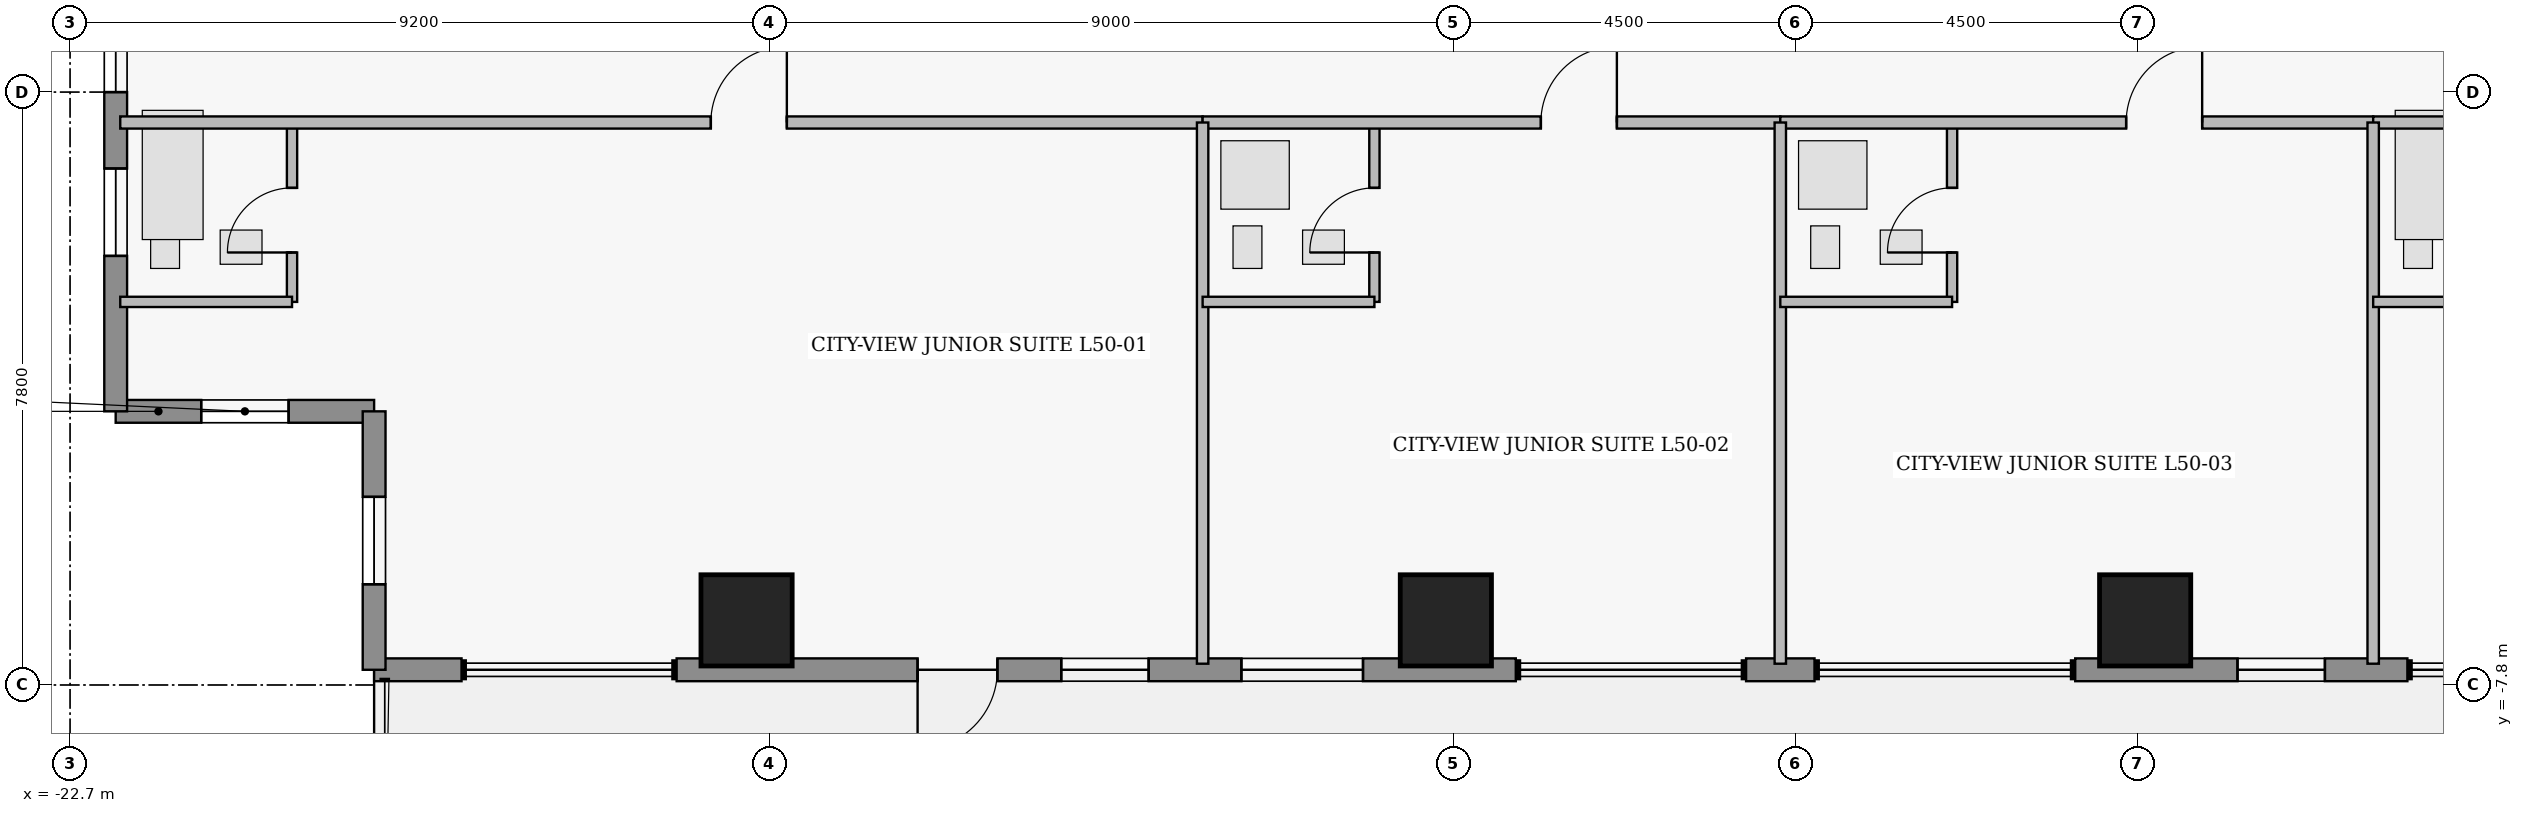
"""IFC4 building model, lengths in metres.
Left out: names, types, materials, properties, quantities, classifications, styles, units other than length and angle.
Written with IfcOpenShell. Run it as: python <this file> out.ifc"""

import sys

from ifc_helpers import new_model, si_unit, direction, frame, frame_2d, origin, origin_2d, place, context, subcontext, project, spatial, rectangle, extrude, element, fill, save


model = new_model("IFC4")
c1 = context("Model", 3, precision=1e-05, world=origin(), true_north=direction((0.0, 1.0)))
c2 = subcontext(c1, "Body", "Model", "MODEL_VIEW")
j1 = project(units=[si_unit("LENGTHUNIT", "METRE"), si_unit("PLANEANGLEUNIT", "RADIAN")], contexts=[c1])
p1 = place(None, origin())
s1 = spatial("IfcSite", under=j1, at=p1, CompositionType="ELEMENT")
p2 = place(p1, origin())
s2 = spatial("IfcBuilding", under=s1, at=p2, CompositionType="ELEMENT")
p3 = place(p2, frame((0.0, 0.0, 199.9)))
s3 = spatial("IfcBuildingStorey", under=s2, at=p3, CompositionType="ELEMENT", Elevation=199.9)
for number, where, z_axis, x_axis in (
    (1, (-13.8, -6.95, 0.0), (0.0, 0.0, 1.0), (1.0, 0.0, 0.0)),
    (2, (-4.6, -6.95, 0.0), (0.0, 0.0, 1.0), (1.0, 0.0, 0.0)),
    (3, (4.6, -6.95, 0.0), (0.0, 0.0, 1.0), (1.0, 0.0, 0.0)),
):
    element("IfcColumn", number, at=place(p3, frame(where, z_axis=z_axis, x_axis=x_axis)), inside=s3, PredefinedType="COLUMN", context=c2, shape_type="SweptSolid", body=[
        extrude(rectangle(XDim=1.2, YDim=1.2, at=origin_2d()), origin(), (0.0, 0.0, 1.0), 3.75),
    ])
p4 = place(p3, frame((-18.7, -4.2, 0.0), z_axis=(0.0, 0.0, 1.0), x_axis=(-1.0, 0.0, 0.0)))
e4 = element("IfcWall", 4, at=p4, inside=s3, PredefinedType="STANDARD", context=c2, shape_type="SweptSolid", body=[
    extrude(rectangle(XDim=3.4, YDim=0.3, at=frame_2d((1.7, 0.0))), origin(), (0.0, 0.0, 1.0), 3.53),
])
p5 = place(p4, frame((1.125, 0.0, 1.25)))
e5 = element("IfcOpeningElement", 5, at=p5, cuts=e4, PredefinedType="OPENING", context=c2, shape_type="SweptSolid", body=[
    extrude(rectangle(XDim=1.15, YDim=1.55, at=frame_2d((0.575, 0.775))), frame((0.0, 0.16, 0.0), z_axis=(0.0, -1.0, 0.0), x_axis=(1.0, 0.0, 0.0)), (0.0, 0.0, 1.0), 0.32),
])
p6 = place(p3, frame((-22.1, -4.2, 0.0), z_axis=(0.0, 0.0, 1.0), x_axis=(0.0, 1.0, 0.0)))
e6 = element("IfcWall", 6, at=p6, inside=s3, PredefinedType="STANDARD", context=c2, shape_type="SweptSolid", body=[
    extrude(rectangle(XDim=6.2, YDim=0.3, at=frame_2d((3.1, 0.0))), origin(), (0.0, 0.0, 1.0), 3.53),
])
p7 = place(p6, frame((2.045, 0.0, 0.95)))
e7 = element("IfcOpeningElement", 7, at=p7, cuts=e6, PredefinedType="OPENING", context=c2, shape_type="SweptSolid", body=[
    extrude(rectangle(XDim=1.15, YDim=1.55, at=frame_2d((0.575, 0.775))), frame((0.0, 0.16, 0.0), z_axis=(0.0, -1.0, 0.0), x_axis=(1.0, 0.0, 0.0)), (0.0, 0.0, 1.0), 0.32),
])
p8 = place(p6, frame((4.2, 0.0, 0.95)))
e8 = element("IfcOpeningElement", 8, at=p8, cuts=e6, PredefinedType="OPENING", context=c2, shape_type="SweptSolid", body=[
    extrude(rectangle(XDim=1.15, YDim=1.55, at=frame_2d((0.575, 0.775))), frame((0.0, 0.16, 0.0), z_axis=(0.0, -1.0, 0.0), x_axis=(1.0, 0.0, 0.0)), (0.0, 0.0, 1.0), 0.32),
])
p9 = place(p3, frame((8.05, -7.6, 0.0), z_axis=(0.0, 0.0, 1.0), x_axis=(-1.0, 0.0, 0.0)))
e9 = element("IfcWall", 9, at=p9, inside=s3, PredefinedType="STANDARD", context=c2, shape_type="SweptSolid", body=[
    extrude(rectangle(XDim=4.37, YDim=0.3, at=frame_2d((2.185, 0.0))), origin(), (0.0, 0.0, 1.0), 3.53),
])
p10 = place(p9, frame((1.085, 0.0, 0.95)))
e10 = element("IfcOpeningElement", 10, at=p10, cuts=e9, PredefinedType="OPENING", context=c2, shape_type="SweptSolid", body=[
    extrude(rectangle(XDim=1.15, YDim=1.55, at=frame_2d((0.575, 0.775))), frame((0.0, 0.16, 0.0), z_axis=(0.0, -1.0, 0.0), x_axis=(1.0, 0.0, 0.0)), (0.0, 0.0, 1.0), 0.32),
])
p11 = place(p3, frame((0.25, -7.6, 0.0), z_axis=(0.0, 0.0, 1.0), x_axis=(-1.0, 0.0, 0.0)))
e11 = element("IfcWall", 11, at=p11, inside=s3, PredefinedType="STANDARD", context=c2, shape_type="SweptSolid", body=[
    extrude(rectangle(XDim=0.9, YDim=0.3, at=frame_2d((0.45, 0.0))), origin(), (0.0, 0.0, 1.0), 3.53),
])
p12 = place(p3, frame((-3.68, -7.6, 0.0), z_axis=(0.0, 0.0, 1.0), x_axis=(-1.0, 0.0, 0.0)))
e12 = element("IfcWall", 12, at=p12, inside=s3, PredefinedType="STANDARD", context=c2, shape_type="SweptSolid", body=[
    extrude(rectangle(XDim=11.04, YDim=0.3, at=frame_2d((5.52, 0.0))), origin(), (0.0, 0.0, 1.0), 3.53),
])
p13 = place(p12, frame((6.82, 0.0, 0.0)))
e13 = element("IfcOpeningElement", 13, at=p13, cuts=e12, PredefinedType="OPENING", context=c2, shape_type="SweptSolid", body=[
    extrude(rectangle(XDim=1.05, YDim=2.2, at=frame_2d((0.525, 1.1))), frame((0.0, 0.16, 0.0), z_axis=(0.0, -1.0, 0.0), x_axis=(1.0, 0.0, 0.0)), (0.0, 0.0, 1.0), 0.32),
])
p14 = place(p12, frame((2.01, 0.0, 0.85)))
e14 = element("IfcOpeningElement", 14, at=p14, cuts=e12, PredefinedType="OPENING", context=c2, shape_type="SweptSolid", body=[
    extrude(rectangle(XDim=1.6, YDim=1.8, at=frame_2d((0.8, 0.9))), frame((0.0, 0.16, 0.0), z_axis=(0.0, -1.0, 0.0), x_axis=(1.0, 0.0, 0.0)), (0.0, 0.0, 1.0), 0.32),
])
p15 = place(p12, frame((4.83, 0.0, 0.95)))
e15 = element("IfcOpeningElement", 15, at=p15, cuts=e12, PredefinedType="OPENING", context=c2, shape_type="SweptSolid", body=[
    extrude(rectangle(XDim=1.15, YDim=1.55, at=frame_2d((0.575, 0.775))), frame((0.0, 0.16, 0.0), z_axis=(0.0, -1.0, 0.0), x_axis=(1.0, 0.0, 0.0)), (0.0, 0.0, 1.0), 0.32),
])
p16 = place(p3, frame((-17.55, -7.6, 0.0), z_axis=(0.0, 0.0, 1.0), x_axis=(-1.0, 0.0, 0.0)))
e16 = element("IfcWall", 16, at=p16, inside=s3, PredefinedType="STANDARD", context=c2, shape_type="SweptSolid", body=[
    extrude(rectangle(XDim=1.15, YDim=0.3, at=frame_2d((0.575, 0.0))), origin(), (0.0, 0.0, 1.0), 3.53),
])
p17 = place(p3, frame((-18.7, -7.6, 0.0), z_axis=(0.0, 0.0, 1.0), x_axis=(0.0, 1.0, 0.0)))
e17 = element("IfcWall", 17, at=p17, inside=s3, PredefinedType="STANDARD", context=c2, shape_type="SweptSolid", body=[
    extrude(rectangle(XDim=3.4, YDim=0.3, at=frame_2d((1.7, 0.0))), origin(), (0.0, 0.0, 1.0), 3.53),
])
p18 = place(p17, frame((1.125, 0.0, 1.25)))
e18 = element("IfcOpeningElement", 18, at=p18, cuts=e17, PredefinedType="OPENING", context=c2, shape_type="SweptSolid", body=[
    extrude(rectangle(XDim=1.15, YDim=1.55, at=frame_2d((0.575, 0.775))), frame((0.0, 0.16, 0.0), z_axis=(0.0, -1.0, 0.0), x_axis=(1.0, 0.0, 0.0)), (0.0, 0.0, 1.0), 0.32),
])
p19 = place(p3, frame((-19.78, -2.76, 0.0), z_axis=(0.0, 0.0, 1.0), x_axis=(0.0, 1.0, 0.0)))
e19 = element("IfcWall", 19, at=p19, inside=s3, PredefinedType="PLUMBINGWALL", context=c2, shape_type="SweptSolid", body=[
    extrude(rectangle(XDim=2.36, YDim=0.135, at=frame_2d((1.18, 0.0))), origin(), (0.0, 0.0, 1.0), 3.53),
])
p20 = place(p19, frame((0.65, 0.0, 0.0)))
e20 = element("IfcOpeningElement", 20, at=p20, cuts=e19, PredefinedType="OPENING", context=c2, shape_type="SweptSolid", body=[
    extrude(rectangle(XDim=0.85, YDim=2.1, at=frame_2d((0.425, 1.05))), frame((0.0, 0.077, 0.0), z_axis=(0.0, -1.0, 0.0), x_axis=(1.0, 0.0, 0.0)), (0.0, 0.0, 1.0), 0.155),
])
p21 = place(p3, frame((-22.04, -0.4, 0.0), z_axis=(0.0, 0.0, 1.0), x_axis=(1.0, 0.0, 0.0)))
e21 = element("IfcWall", 21, at=p21, inside=s3, PredefinedType="PARTITIONING", context=c2, shape_type="SweptSolid", body=[
    extrude(rectangle(XDim=14.24, YDim=0.16, at=frame_2d((7.12, 0.0))), origin(), (0.0, 0.0, 1.0), 3.53),
])
p22 = place(p21, frame((7.77, 0.0, 0.0)))
e22 = element("IfcOpeningElement", 22, at=p22, cuts=e21, PredefinedType="OPENING", context=c2, shape_type="SweptSolid", body=[
    extrude(rectangle(XDim=1.0, YDim=2.15, at=frame_2d((0.5, 1.075))), frame((0.0, 0.09, 0.0), z_axis=(0.0, -1.0, 0.0), x_axis=(1.0, 0.0, 0.0)), (0.0, 0.0, 1.0), 0.18),
])
p23 = place(p3, frame((-5.54, -2.76, 0.0), z_axis=(0.0, 0.0, 1.0), x_axis=(0.0, 1.0, 0.0)))
e23 = element("IfcWall", 23, at=p23, inside=s3, PredefinedType="PLUMBINGWALL", context=c2, shape_type="SweptSolid", body=[
    extrude(rectangle(XDim=2.36, YDim=0.135, at=frame_2d((1.18, 0.0))), origin(), (0.0, 0.0, 1.0), 3.53),
])
p24 = place(p23, frame((0.65, 0.0, 0.0)))
e24 = element("IfcOpeningElement", 24, at=p24, cuts=e23, PredefinedType="OPENING", context=c2, shape_type="SweptSolid", body=[
    extrude(rectangle(XDim=0.85, YDim=2.1, at=frame_2d((0.425, 1.05))), frame((0.0, 0.077, 0.0), z_axis=(0.0, -1.0, 0.0), x_axis=(1.0, 0.0, 0.0)), (0.0, 0.0, 1.0), 0.155),
])
p25 = place(p3, frame((-7.8, -0.4, 0.0), z_axis=(0.0, 0.0, 1.0), x_axis=(1.0, 0.0, 0.0)))
e25 = element("IfcWall", 25, at=p25, inside=s3, PredefinedType="PARTITIONING", context=c2, shape_type="SweptSolid", body=[
    extrude(rectangle(XDim=7.6, YDim=0.16, at=frame_2d((3.8, 0.0))), origin(), (0.0, 0.0, 1.0), 3.53),
])
p26 = place(p25, frame((4.45, 0.0, 0.0)))
e26 = element("IfcOpeningElement", 26, at=p26, cuts=e25, PredefinedType="OPENING", context=c2, shape_type="SweptSolid", body=[
    extrude(rectangle(XDim=1.0, YDim=2.15, at=frame_2d((0.5, 1.075))), frame((0.0, 0.09, 0.0), z_axis=(0.0, -1.0, 0.0), x_axis=(1.0, 0.0, 0.0)), (0.0, 0.0, 1.0), 0.18),
])
p27 = place(p3, frame((2.06, -2.76, 0.0), z_axis=(0.0, 0.0, 1.0), x_axis=(0.0, 1.0, 0.0)))
e27 = element("IfcWall", 27, at=p27, inside=s3, PredefinedType="PLUMBINGWALL", context=c2, shape_type="SweptSolid", body=[
    extrude(rectangle(XDim=2.36, YDim=0.135, at=frame_2d((1.18, 0.0))), origin(), (0.0, 0.0, 1.0), 3.53),
])
p28 = place(p27, frame((0.65, 0.0, 0.0)))
e28 = element("IfcOpeningElement", 28, at=p28, cuts=e27, PredefinedType="OPENING", context=c2, shape_type="SweptSolid", body=[
    extrude(rectangle(XDim=0.85, YDim=2.1, at=frame_2d((0.425, 1.05))), frame((0.0, 0.077, 0.0), z_axis=(0.0, -1.0, 0.0), x_axis=(1.0, 0.0, 0.0)), (0.0, 0.0, 1.0), 0.155),
])
p29 = place(p3, frame((-0.2, -0.4, 0.0), z_axis=(0.0, 0.0, 1.0), x_axis=(1.0, 0.0, 0.0)))
e29 = element("IfcWall", 29, at=p29, inside=s3, PredefinedType="PARTITIONING", context=c2, shape_type="SweptSolid", body=[
    extrude(rectangle(XDim=7.8, YDim=0.16, at=frame_2d((3.9, 0.0))), origin(), (0.0, 0.0, 1.0), 3.53),
])
p30 = place(p29, frame((4.55, 0.0, 0.0)))
e30 = element("IfcOpeningElement", 30, at=p30, cuts=e29, PredefinedType="OPENING", context=c2, shape_type="SweptSolid", body=[
    extrude(rectangle(XDim=1.0, YDim=2.15, at=frame_2d((0.5, 1.075))), frame((0.0, 0.09, 0.0), z_axis=(0.0, -1.0, 0.0), x_axis=(1.0, 0.0, 0.0)), (0.0, 0.0, 1.0), 0.18),
])
p31 = place(p3, frame((7.6, -0.4, 0.0), z_axis=(0.0, 0.0, 1.0), x_axis=(1.0, 0.0, 0.0)))
e31 = element("IfcWall", 31, at=p31, inside=s3, PredefinedType="PARTITIONING", context=c2, shape_type="SweptSolid", body=[
    extrude(rectangle(XDim=14.44, YDim=0.16, at=frame_2d((7.22, 0.0))), origin(), (0.0, 0.0, 1.0), 3.53),
])
p32 = place(p31, frame((7.87, 0.0, 0.0)))
e32 = element("IfcOpeningElement", 32, at=p32, cuts=e31, PredefinedType="OPENING", context=c2, shape_type="SweptSolid", body=[
    extrude(rectangle(XDim=1.0, YDim=2.15, at=frame_2d((0.5, 1.075))), frame((0.0, 0.09, 0.0), z_axis=(0.0, -1.0, 0.0), x_axis=(1.0, 0.0, 0.0)), (0.0, 0.0, 1.0), 0.18),
])
p33 = place(p3, frame((-22.04, -2.76, 0.0), z_axis=(0.0, 0.0, 1.0), x_axis=(1.0, 0.0, 0.0)))
e33 = element("IfcWall", 33, at=p33, inside=s3, PredefinedType="PLUMBINGWALL", context=c2, shape_type="SweptSolid", body=[
    extrude(rectangle(XDim=2.26, YDim=0.135, at=frame_2d((1.13, 0.0))), origin(), (0.0, 0.0, 1.0), 3.53),
])
p34 = place(p3, frame((-7.8, -7.52, 0.0), z_axis=(0.0, 0.0, 1.0), x_axis=(0.0, 1.0, 0.0)))
e34 = element("IfcWall", 34, at=p34, inside=s3, PredefinedType="PARTITIONING", context=c2, shape_type="SweptSolid", body=[
    extrude(rectangle(XDim=7.12, YDim=0.15, at=frame_2d((3.56, 0.0))), origin(), (0.0, 0.0, 1.0), 3.53),
])
p35 = place(p3, frame((-7.8, -2.76, 0.0), z_axis=(0.0, 0.0, 1.0), x_axis=(1.0, 0.0, 0.0)))
e35 = element("IfcWall", 35, at=p35, inside=s3, PredefinedType="PLUMBINGWALL", context=c2, shape_type="SweptSolid", body=[
    extrude(rectangle(XDim=2.26, YDim=0.135, at=frame_2d((1.13, 0.0))), origin(), (0.0, 0.0, 1.0), 3.124),
])
p36 = place(p3, frame((-0.2, -7.52, 0.0), z_axis=(0.0, 0.0, 1.0), x_axis=(0.0, 1.0, 0.0)))
e36 = element("IfcWall", 36, at=p36, inside=s3, PredefinedType="PARTITIONING", context=c2, shape_type="SweptSolid", body=[
    extrude(rectangle(XDim=7.12, YDim=0.15, at=frame_2d((3.56, 0.0))), origin(), (0.0, 0.0, 1.0), 3.53),
])
p37 = place(p3, frame((-0.2, -2.76, 0.0), z_axis=(0.0, 0.0, 1.0), x_axis=(1.0, 0.0, 0.0)))
e37 = element("IfcWall", 37, at=p37, inside=s3, PredefinedType="PLUMBINGWALL", context=c2, shape_type="SweptSolid", body=[
    extrude(rectangle(XDim=2.26, YDim=0.135, at=frame_2d((1.13, 0.0))), origin(), (0.0, 0.0, 1.0), 3.124),
])
p38 = place(p3, frame((7.6, -7.52, 0.0), z_axis=(0.0, 0.0, 1.0), x_axis=(0.0, 1.0, 0.0)))
e38 = element("IfcWall", 38, at=p38, inside=s3, PredefinedType="PARTITIONING", context=c2, shape_type="SweptSolid", body=[
    extrude(rectangle(XDim=7.12, YDim=0.15, at=frame_2d((3.56, 0.0))), origin(), (0.0, 0.0, 1.0), 3.53),
])
p39 = place(p3, frame((7.6, -2.76, 0.0), z_axis=(0.0, 0.0, 1.0), x_axis=(1.0, 0.0, 0.0)))
e39 = element("IfcWall", 39, at=p39, inside=s3, PredefinedType="PLUMBINGWALL", context=c2, shape_type="SweptSolid", body=[
    extrude(rectangle(XDim=2.26, YDim=0.135, at=frame_2d((1.13, 0.0))), origin(), (0.0, 0.0, 1.0), 3.124),
])
p40 = place(p5, origin())
e40 = element("IfcWindow", 40, at=p40, inside=s3, PartitioningType="SINGLE_PANEL", PredefinedType="WINDOW", context=c2, shape_type="SweptSolid", body=[
    extrude(rectangle(XDim=1.15, YDim=1.55, at=frame_2d((0.575, 0.775))), frame((0.0, 0.03, 0.0), z_axis=(0.0, -1.0, 0.0), x_axis=(1.0, 0.0, 0.0)), (0.0, 0.0, 1.0), 0.06),
])
fill(e5, e40)
p41 = place(p7, origin())
e41 = element("IfcWindow", 41, at=p41, inside=s3, PartitioningType="SINGLE_PANEL", PredefinedType="WINDOW", context=c2, shape_type="SweptSolid", body=[
    extrude(rectangle(XDim=1.15, YDim=1.55, at=frame_2d((0.575, 0.775))), frame((0.0, 0.03, 0.0), z_axis=(0.0, -1.0, 0.0), x_axis=(1.0, 0.0, 0.0)), (0.0, 0.0, 1.0), 0.06),
])
fill(e7, e41)
p42 = place(p8, origin())
e42 = element("IfcWindow", 42, at=p42, inside=s3, PartitioningType="SINGLE_PANEL", PredefinedType="WINDOW", context=c2, shape_type="SweptSolid", body=[
    extrude(rectangle(XDim=1.15, YDim=1.55, at=frame_2d((0.575, 0.775))), frame((0.0, 0.03, 0.0), z_axis=(0.0, -1.0, 0.0), x_axis=(1.0, 0.0, 0.0)), (0.0, 0.0, 1.0), 0.06),
])
fill(e8, e42)
p43 = place(p10, origin())
e43 = element("IfcWindow", 43, at=p43, inside=s3, PartitioningType="SINGLE_PANEL", PredefinedType="WINDOW", context=c2, shape_type="SweptSolid", body=[
    extrude(rectangle(XDim=1.15, YDim=1.55, at=frame_2d((0.575, 0.775))), frame((0.0, 0.03, 0.0), z_axis=(0.0, -1.0, 0.0), x_axis=(1.0, 0.0, 0.0)), (0.0, 0.0, 1.0), 0.06),
])
fill(e10, e43)
p44 = place(p13, origin())
e44 = element("IfcDoor", 44, at=p44, inside=s3, OperationType="SINGLE_SWING_RIGHT", PredefinedType="DOOR", context=c2, shape_type="SweptSolid", body=[
    extrude(rectangle(XDim=1.05, YDim=2.2, at=frame_2d((0.525, 1.1))), frame((0.0, 0.025, 0.0), z_axis=(0.0, -1.0, 0.0), x_axis=(1.0, 0.0, 0.0)), (0.0, 0.0, 1.0), 0.05),
])
fill(e13, e44)
p45 = place(p14, origin())
e45 = element("IfcWindow", 45, at=p45, inside=s3, PartitioningType="SINGLE_PANEL", PredefinedType="WINDOW", context=c2, shape_type="SweptSolid", body=[
    extrude(rectangle(XDim=1.6, YDim=1.8, at=frame_2d((0.8, 0.9))), frame((0.0, 0.03, 0.0), z_axis=(0.0, -1.0, 0.0), x_axis=(1.0, 0.0, 0.0)), (0.0, 0.0, 1.0), 0.06),
])
fill(e14, e45)
p46 = place(p15, origin())
e46 = element("IfcWindow", 46, at=p46, inside=s3, PartitioningType="SINGLE_PANEL", PredefinedType="WINDOW", context=c2, shape_type="SweptSolid", body=[
    extrude(rectangle(XDim=1.15, YDim=1.55, at=frame_2d((0.575, 0.775))), frame((0.0, 0.03, 0.0), z_axis=(0.0, -1.0, 0.0), x_axis=(1.0, 0.0, 0.0)), (0.0, 0.0, 1.0), 0.06),
])
fill(e15, e46)
p47 = place(p18, origin())
e47 = element("IfcWindow", 47, at=p47, inside=s3, PartitioningType="SINGLE_PANEL", PredefinedType="WINDOW", context=c2, shape_type="SweptSolid", body=[
    extrude(rectangle(XDim=1.15, YDim=1.55, at=frame_2d((0.575, 0.775))), frame((0.0, 0.03, 0.0), z_axis=(0.0, -1.0, 0.0), x_axis=(1.0, 0.0, 0.0)), (0.0, 0.0, 1.0), 0.06),
])
fill(e18, e47)
p48 = place(p20, origin())
e48 = element("IfcDoor", 48, at=p48, inside=s3, OperationType="SINGLE_SWING_LEFT", PredefinedType="DOOR", context=c2, shape_type="SweptSolid", body=[
    extrude(rectangle(XDim=0.85, YDim=2.1, at=frame_2d((0.425, 1.05))), frame((0.0, 0.025, 0.0), z_axis=(0.0, -1.0, 0.0), x_axis=(1.0, 0.0, 0.0)), (0.0, 0.0, 1.0), 0.05),
])
fill(e20, e48)
p49 = place(p22, origin())
e49 = element("IfcDoor", 49, at=p49, inside=s3, OperationType="SINGLE_SWING_RIGHT", PredefinedType="DOOR", context=c2, shape_type="SweptSolid", body=[
    extrude(rectangle(XDim=1.0, YDim=2.15, at=frame_2d((0.5, 1.075))), frame((0.0, 0.025, 0.0), z_axis=(0.0, -1.0, 0.0), x_axis=(1.0, 0.0, 0.0)), (0.0, 0.0, 1.0), 0.05),
])
fill(e22, e49)
p50 = place(p24, origin())
e50 = element("IfcDoor", 50, at=p50, inside=s3, OperationType="SINGLE_SWING_LEFT", PredefinedType="DOOR", context=c2, shape_type="SweptSolid", body=[
    extrude(rectangle(XDim=0.85, YDim=2.1, at=frame_2d((0.425, 1.05))), frame((0.0, 0.025, 0.0), z_axis=(0.0, -1.0, 0.0), x_axis=(1.0, 0.0, 0.0)), (0.0, 0.0, 1.0), 0.05),
])
fill(e24, e50)
p51 = place(p26, origin())
e51 = element("IfcDoor", 51, at=p51, inside=s3, OperationType="SINGLE_SWING_RIGHT", PredefinedType="DOOR", context=c2, shape_type="SweptSolid", body=[
    extrude(rectangle(XDim=1.0, YDim=2.15, at=frame_2d((0.5, 1.075))), frame((0.0, 0.025, 0.0), z_axis=(0.0, -1.0, 0.0), x_axis=(1.0, 0.0, 0.0)), (0.0, 0.0, 1.0), 0.05),
])
fill(e26, e51)
p52 = place(p28, origin())
e52 = element("IfcDoor", 52, at=p52, inside=s3, OperationType="SINGLE_SWING_LEFT", PredefinedType="DOOR", context=c2, shape_type="SweptSolid", body=[
    extrude(rectangle(XDim=0.85, YDim=2.1, at=frame_2d((0.425, 1.05))), frame((0.0, 0.025, 0.0), z_axis=(0.0, -1.0, 0.0), x_axis=(1.0, 0.0, 0.0)), (0.0, 0.0, 1.0), 0.05),
])
fill(e28, e52)
p53 = place(p30, origin())
e53 = element("IfcDoor", 53, at=p53, inside=s3, OperationType="SINGLE_SWING_RIGHT", PredefinedType="DOOR", context=c2, shape_type="SweptSolid", body=[
    extrude(rectangle(XDim=1.0, YDim=2.15, at=frame_2d((0.5, 1.075))), frame((0.0, 0.025, 0.0), z_axis=(0.0, -1.0, 0.0), x_axis=(1.0, 0.0, 0.0)), (0.0, 0.0, 1.0), 0.05),
])
fill(e30, e53)
save(model, sys.argv[1])
